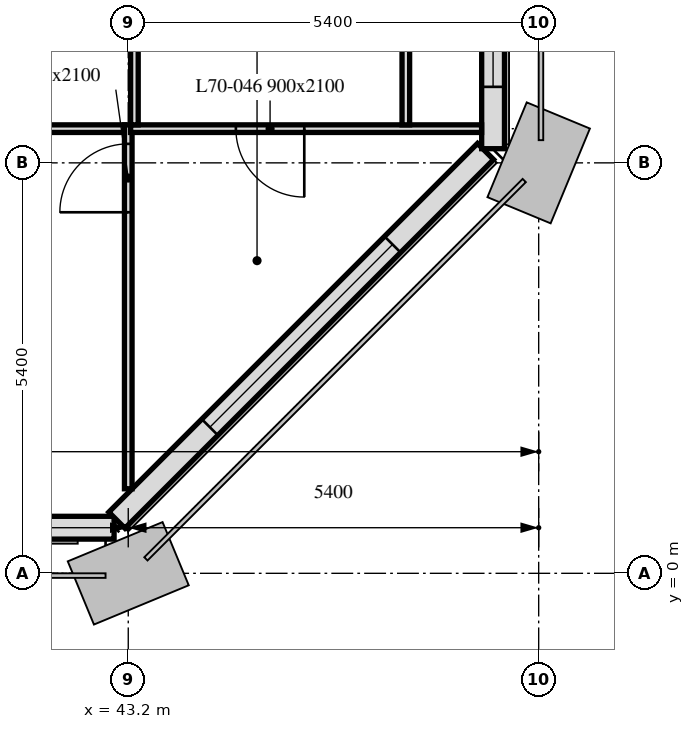
"""IFC4 building model, lengths in metres.
Left out: names, types, materials, properties, quantities, classifications, styles, units other than length and angle.
Written with IfcOpenShell. Run it as: python <this file> out.ifc"""

import sys

from ifc_helpers import new_model, si_unit, direction, frame, frame_2d, origin, place, context, subcontext, project, spatial, rectangle, extrude, element, fill, save


model = new_model("IFC4")
c1 = context("Model", 3, precision=1e-05, world=origin(), true_north=direction((0.0, 1.0)))
c2 = subcontext(c1, "Body", "Model", "MODEL_VIEW")
j1 = project(units=[si_unit("LENGTHUNIT", "METRE"), si_unit("PLANEANGLEUNIT", "RADIAN")], contexts=[c1])
p1 = place(None, origin())
s1 = spatial("IfcSite", under=j1, at=p1, CompositionType="ELEMENT")
p2 = place(p1, origin())
s2 = spatial("IfcBuilding", under=s1, at=p2, CompositionType="ELEMENT")
p3 = place(p2, frame((0.0, 0.0, 285.1)))
s3 = spatial("IfcBuildingStorey", under=s2, at=p3, CompositionType="ELEMENT", Elevation=285.1)
p4 = place(p3, frame((10.986, 0.6, 0.0), z_axis=(0.0, 0.0, 1.0), x_axis=(1.0, 0.0, 0.0)))
e1 = element("IfcWall", 1, at=p4, inside=s3, PredefinedType="SOLIDWALL", context=c2, shape_type="SweptSolid", body=[
    extrude(rectangle(XDim=32.027, YDim=0.3, at=frame_2d((16.014, 0.0))), origin(), (0.0, 0.0, 1.0), 3.0),
])
p5 = place(p4, frame((0.814, 0.0, 0.9)))
e2 = element("IfcOpeningElement", 2, at=p5, cuts=e1, PredefinedType="OPENING", context=c2, shape_type="SweptSolid", body=[
    extrude(rectangle(XDim=3.4, YDim=1.7, at=frame_2d((1.7, 0.85))), frame((0.0, 0.16, 0.0), z_axis=(0.0, -1.0, 0.0), x_axis=(1.0, 0.0, 0.0)), (0.0, 0.0, 1.0), 0.32),
])
p6 = place(p4, frame((6.564, 0.0, 0.9)))
e3 = element("IfcOpeningElement", 3, at=p6, cuts=e1, PredefinedType="OPENING", context=c2, shape_type="SweptSolid", body=[
    extrude(rectangle(XDim=1.1, YDim=1.7, at=frame_2d((0.55, 0.85))), frame((0.0, 0.16, 0.0), z_axis=(0.0, -1.0, 0.0), x_axis=(1.0, 0.0, 0.0)), (0.0, 0.0, 1.0), 0.32),
])
p7 = place(p4, frame((11.614, 0.0, 0.9)))
e4 = element("IfcOpeningElement", 4, at=p7, cuts=e1, PredefinedType="OPENING", context=c2, shape_type="SweptSolid", body=[
    extrude(rectangle(XDim=3.4, YDim=1.7, at=frame_2d((1.7, 0.85))), frame((0.0, 0.16, 0.0), z_axis=(0.0, -1.0, 0.0), x_axis=(1.0, 0.0, 0.0)), (0.0, 0.0, 1.0), 0.32),
])
p8 = place(p4, frame((17.364, 0.0, 0.9)))
e5 = element("IfcOpeningElement", 5, at=p8, cuts=e1, PredefinedType="OPENING", context=c2, shape_type="SweptSolid", body=[
    extrude(rectangle(XDim=1.1, YDim=1.7, at=frame_2d((0.55, 0.85))), frame((0.0, 0.16, 0.0), z_axis=(0.0, -1.0, 0.0), x_axis=(1.0, 0.0, 0.0)), (0.0, 0.0, 1.0), 0.32),
])
p9 = place(p4, frame((22.414, 0.0, 0.9)))
e6 = element("IfcOpeningElement", 6, at=p9, cuts=e1, PredefinedType="OPENING", context=c2, shape_type="SweptSolid", body=[
    extrude(rectangle(XDim=3.4, YDim=1.7, at=frame_2d((1.7, 0.85))), frame((0.0, 0.16, 0.0), z_axis=(0.0, -1.0, 0.0), x_axis=(1.0, 0.0, 0.0)), (0.0, 0.0, 1.0), 0.32),
])
p10 = place(p4, frame((28.164, 0.0, 0.9)))
e7 = element("IfcOpeningElement", 7, at=p10, cuts=e1, PredefinedType="OPENING", context=c2, shape_type="SweptSolid", body=[
    extrude(rectangle(XDim=1.1, YDim=1.7, at=frame_2d((0.55, 0.85))), frame((0.0, 0.16, 0.0), z_axis=(0.0, -1.0, 0.0), x_axis=(1.0, 0.0, 0.0)), (0.0, 0.0, 1.0), 0.32),
])
p11 = place(p3, frame((43.051, 0.699, 0.0), z_axis=(0.0, 0.0, 1.0), x_axis=(0.707106781187, 0.707106781187, 0.0)))
e8 = element("IfcWall", 8, at=p11, inside=s3, PredefinedType="SOLIDWALL", context=c2, shape_type="SweptSolid", body=[
    extrude(rectangle(XDim=6.86, YDim=0.3, at=frame_2d((3.43, 0.0))), origin(), (0.0, 0.0, 1.0), 3.0),
])
p12 = place(p11, frame((1.73, 0.0, 0.9)))
e9 = element("IfcOpeningElement", 9, at=p12, cuts=e8, PredefinedType="OPENING", context=c2, shape_type="SweptSolid", body=[
    extrude(rectangle(XDim=3.4, YDim=1.7, at=frame_2d((1.7, 0.85))), frame((0.0, 0.16, 0.0), z_axis=(0.0, -1.0, 0.0), x_axis=(1.0, 0.0, 0.0)), (0.0, 0.0, 1.0), 0.32),
])
p13 = place(p3, frame((48.0, 5.586, 0.0), z_axis=(0.0, 0.0, 1.0), x_axis=(0.0, 1.0, 0.0)))
e10 = element("IfcWall", 10, at=p13, inside=s3, PredefinedType="SOLIDWALL", context=c2, shape_type="SweptSolid", body=[
    extrude(rectangle(XDim=32.027, YDim=0.3, at=frame_2d((16.014, 0.0))), origin(), (0.0, 0.0, 1.0), 3.0),
])
p14 = place(p13, frame((0.814, 0.0, 0.9)))
e11 = element("IfcOpeningElement", 11, at=p14, cuts=e10, PredefinedType="OPENING", context=c2, shape_type="SweptSolid", body=[
    extrude(rectangle(XDim=3.4, YDim=1.7, at=frame_2d((1.7, 0.85))), frame((0.0, 0.16, 0.0), z_axis=(0.0, -1.0, 0.0), x_axis=(1.0, 0.0, 0.0)), (0.0, 0.0, 1.0), 0.32),
])
p15 = place(p13, frame((6.564, 0.0, 0.9)))
e12 = element("IfcOpeningElement", 12, at=p15, cuts=e10, PredefinedType="OPENING", context=c2, shape_type="SweptSolid", body=[
    extrude(rectangle(XDim=1.1, YDim=1.7, at=frame_2d((0.55, 0.85))), frame((0.0, 0.16, 0.0), z_axis=(0.0, -1.0, 0.0), x_axis=(1.0, 0.0, 0.0)), (0.0, 0.0, 1.0), 0.32),
])
p16 = place(p13, frame((8.514, 0.0, 0.9)))
e13 = element("IfcOpeningElement", 13, at=p16, cuts=e10, PredefinedType="OPENING", context=c2, shape_type="SweptSolid", body=[
    extrude(rectangle(XDim=1.1, YDim=1.7, at=frame_2d((0.55, 0.85))), frame((0.0, 0.16, 0.0), z_axis=(0.0, -1.0, 0.0), x_axis=(1.0, 0.0, 0.0)), (0.0, 0.0, 1.0), 0.32),
])
p17 = place(p13, frame((11.614, 0.0, 0.9)))
e14 = element("IfcOpeningElement", 14, at=p17, cuts=e10, PredefinedType="OPENING", context=c2, shape_type="SweptSolid", body=[
    extrude(rectangle(XDim=3.4, YDim=1.7, at=frame_2d((1.7, 0.85))), frame((0.0, 0.16, 0.0), z_axis=(0.0, -1.0, 0.0), x_axis=(1.0, 0.0, 0.0)), (0.0, 0.0, 1.0), 0.32),
])
p18 = place(p13, frame((17.364, 0.0, 0.9)))
e15 = element("IfcOpeningElement", 15, at=p18, cuts=e10, PredefinedType="OPENING", context=c2, shape_type="SweptSolid", body=[
    extrude(rectangle(XDim=1.1, YDim=1.7, at=frame_2d((0.55, 0.85))), frame((0.0, 0.16, 0.0), z_axis=(0.0, -1.0, 0.0), x_axis=(1.0, 0.0, 0.0)), (0.0, 0.0, 1.0), 0.32),
])
p19 = place(p13, frame((18.964, 0.0, 0.9)))
e16 = element("IfcOpeningElement", 16, at=p19, cuts=e10, PredefinedType="OPENING", context=c2, shape_type="SweptSolid", body=[
    extrude(rectangle(XDim=1.1, YDim=1.7, at=frame_2d((0.55, 0.85))), frame((0.0, 0.16, 0.0), z_axis=(0.0, -1.0, 0.0), x_axis=(1.0, 0.0, 0.0)), (0.0, 0.0, 1.0), 0.32),
])
p20 = place(p13, frame((22.414, 0.0, 0.9)))
e17 = element("IfcOpeningElement", 17, at=p20, cuts=e10, PredefinedType="OPENING", context=c2, shape_type="SweptSolid", body=[
    extrude(rectangle(XDim=3.4, YDim=1.7, at=frame_2d((1.7, 0.85))), frame((0.0, 0.16, 0.0), z_axis=(0.0, -1.0, 0.0), x_axis=(1.0, 0.0, 0.0)), (0.0, 0.0, 1.0), 0.32),
])
p21 = place(p13, frame((28.239, 0.0, 0.9)))
e18 = element("IfcOpeningElement", 18, at=p21, cuts=e10, PredefinedType="OPENING", context=c2, shape_type="SweptSolid", body=[
    extrude(rectangle(XDim=0.65, YDim=1.7, at=frame_2d((0.325, 0.85))), frame((0.0, 0.16, 0.0), z_axis=(0.0, -1.0, 0.0), x_axis=(1.0, 0.0, 0.0)), (0.0, 0.0, 1.0), 0.32),
])
p22 = place(p13, frame((29.764, 0.0, 0.9)))
e19 = element("IfcOpeningElement", 19, at=p22, cuts=e10, PredefinedType="OPENING", context=c2, shape_type="SweptSolid", body=[
    extrude(rectangle(XDim=1.1, YDim=1.7, at=frame_2d((0.55, 0.85))), frame((0.0, 0.16, 0.0), z_axis=(0.0, -1.0, 0.0), x_axis=(1.0, 0.0, 0.0)), (0.0, 0.0, 1.0), 0.32),
])
p23 = place(p3, frame((43.2, 1.112, 0.0), z_axis=(0.0, 0.0, 1.0), x_axis=(0.0, 1.0, 0.0)))
e20 = element("IfcWall", 20, at=p23, inside=s3, PredefinedType="PARTITIONING", context=c2, shape_type="SweptSolid", body=[
    extrude(rectangle(XDim=4.788, YDim=0.1, at=frame_2d((2.394, 0.0))), origin(), (0.0, 0.0, 1.0), 3.0),
])
p24 = place(p23, frame((3.638, 0.0, 0.0)))
e21 = element("IfcOpeningElement", 21, at=p24, cuts=e20, PredefinedType="OPENING", context=c2, shape_type="SweptSolid", body=[
    extrude(rectangle(XDim=0.9, YDim=2.1, at=frame_2d((0.45, 1.05))), frame((0.0, 0.05, 0.0), z_axis=(0.0, -1.0, 0.0), x_axis=(1.0, 0.0, 0.0)), (0.0, 0.0, 1.0), 0.1),
])
p25 = place(p3, frame((43.15, 5.85, 0.0), z_axis=(0.0, 0.0, 1.0), x_axis=(-1.0, 0.0, 0.0)))
e22 = element("IfcWall", 22, at=p25, inside=s3, PredefinedType="PARTITIONING", context=c2, shape_type="SweptSolid", body=[
    extrude(rectangle(XDim=5.35, YDim=0.1, at=frame_2d((2.675, 0.0))), origin(), (0.0, 0.0, 1.0), 3.0),
])
p26 = place(p25, frame((3.048, 0.0, 0.0)))
e23 = element("IfcOpeningElement", 23, at=p26, cuts=e22, PredefinedType="OPENING", context=c2, shape_type="SweptSolid", body=[
    extrude(rectangle(XDim=0.9, YDim=2.1, at=frame_2d((0.45, 1.05))), frame((0.0, 0.05, 0.0), z_axis=(0.0, -1.0, 0.0), x_axis=(1.0, 0.0, 0.0)), (0.0, 0.0, 1.0), 0.1),
])
p27 = place(p3, frame((47.849, 5.85, 0.0), z_axis=(0.0, 0.0, 1.0), x_axis=(-1.0, 0.0, 0.0)))
e24 = element("IfcWall", 24, at=p27, inside=s3, PredefinedType="PARTITIONING", context=c2, shape_type="SweptSolid", body=[
    extrude(rectangle(XDim=4.618, YDim=0.1, at=frame_2d((2.309, 0.0))), origin(), (0.0, 0.0, 1.0), 3.0),
])
p28 = place(p27, frame((2.333, 0.0, 0.0)))
e25 = element("IfcOpeningElement", 25, at=p28, cuts=e24, PredefinedType="OPENING", context=c2, shape_type="SweptSolid", body=[
    extrude(rectangle(XDim=0.9, YDim=2.1, at=frame_2d((0.45, 1.05))), frame((0.0, 0.05, 0.0), z_axis=(0.0, -1.0, 0.0), x_axis=(1.0, 0.0, 0.0)), (0.0, 0.0, 1.0), 0.1),
])
p29 = place(p3, frame((43.281, 5.9, 0.0), z_axis=(0.0, 0.0, 1.0), x_axis=(0.0, 1.0, 0.0)))
e26 = element("IfcWall", 26, at=p29, inside=s3, PredefinedType="PARTITIONING", context=c2, shape_type="SweptSolid", body=[
    extrude(rectangle(XDim=4.555, YDim=0.1, at=frame_2d((2.278, 0.0))), origin(), (0.0, 0.0, 1.0), 3.0),
])
p30 = place(p3, frame((46.852, 5.9, 0.0), z_axis=(0.0, 0.0, 1.0), x_axis=(0.0, 1.0, 0.0)))
e27 = element("IfcWall", 27, at=p30, inside=s3, PredefinedType="PARTITIONING", context=c2, shape_type="SweptSolid", body=[
    extrude(rectangle(XDim=7.975, YDim=0.1, at=frame_2d((3.988, 0.0))), origin(), (0.0, 0.0, 1.0), 2.4),
])
p31 = place(p30, frame((2.3, 0.0, 0.0)))
e28 = element("IfcOpeningElement", 28, at=p31, cuts=e27, PredefinedType="OPENING", context=c2, shape_type="SweptSolid", body=[
    extrude(rectangle(XDim=0.9, YDim=2.1, at=frame_2d((0.45, 1.05))), frame((0.0, 0.05, 0.0), z_axis=(0.0, -1.0, 0.0), x_axis=(1.0, 0.0, 0.0)), (0.0, 0.0, 1.0), 0.1),
])
p32 = place(p12, origin())
e29 = element("IfcWindow", 29, at=p32, inside=s3, PartitioningType="SINGLE_PANEL", PredefinedType="WINDOW", context=c2, shape_type="SweptSolid", body=[
    extrude(rectangle(XDim=3.4, YDim=1.7, at=frame_2d((1.7, 0.85))), frame((0.0, 0.03, 0.0), z_axis=(0.0, -1.0, 0.0), x_axis=(1.0, 0.0, 0.0)), (0.0, 0.0, 1.0), 0.06),
])
fill(e9, e29)
p33 = place(p14, origin())
e30 = element("IfcWindow", 30, at=p33, inside=s3, PartitioningType="SINGLE_PANEL", PredefinedType="WINDOW", context=c2, shape_type="SweptSolid", body=[
    extrude(rectangle(XDim=3.4, YDim=1.7, at=frame_2d((1.7, 0.85))), frame((0.0, 0.03, 0.0), z_axis=(0.0, -1.0, 0.0), x_axis=(1.0, 0.0, 0.0)), (0.0, 0.0, 1.0), 0.06),
])
fill(e11, e30)
p34 = place(p28, origin())
e31 = element("IfcDoor", 31, at=p34, inside=s3, OperationType="SINGLE_SWING_LEFT", PredefinedType="DOOR", context=c2, shape_type="SweptSolid", body=[
    extrude(rectangle(XDim=0.9, YDim=2.1, at=frame_2d((0.45, 1.05))), frame((0.0, 0.025, 0.0), z_axis=(0.0, -1.0, 0.0), x_axis=(1.0, 0.0, 0.0)), (0.0, 0.0, 1.0), 0.05),
])
fill(e25, e31)
p35 = place(p24, origin())
e32 = element("IfcDoor", 32, at=p35, inside=s3, OperationType="SINGLE_SWING_LEFT", PredefinedType="DOOR", context=c2, shape_type="SweptSolid", body=[
    extrude(rectangle(XDim=0.9, YDim=2.1, at=frame_2d((0.45, 1.05))), frame((0.0, 0.025, 0.0), z_axis=(0.0, -1.0, 0.0), x_axis=(1.0, 0.0, 0.0)), (0.0, 0.0, 1.0), 0.05),
])
fill(e21, e32)
save(model, sys.argv[1])
